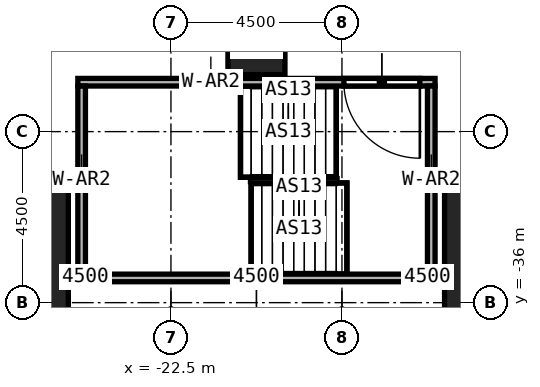
"""IFC4 building model, lengths in metres.
Left out: names, types, materials, properties, quantities, classifications, styles, units other than length and angle.
Written with IfcOpenShell. Run it as: python <this file> out.ifc"""

import sys

from ifc_helpers import new_model, si_unit, direction, frame, frame_2d, origin, origin_2d, place, context, subcontext, project, spatial, rectangle, extrude, element, fill, save


model = new_model("IFC4")
c1 = context("Model", 3, precision=1e-05, world=origin(), true_north=direction((0.0, 1.0)))
c2 = subcontext(c1, "Body", "Model", "MODEL_VIEW")
j1 = project(units=[si_unit("LENGTHUNIT", "METRE"), si_unit("PLANEANGLEUNIT", "RADIAN")], contexts=[c1])
p1 = place(None, origin())
s1 = spatial("IfcSite", under=j1, at=p1, CompositionType="ELEMENT")
p2 = place(p1, origin())
s2 = spatial("IfcBuilding", under=s1, at=p2, CompositionType="ELEMENT")
p3 = place(p2, frame((0.0, 0.0, 25.0)))
s3 = spatial("IfcBuildingStorey", under=s2, at=p3, CompositionType="ELEMENT", Elevation=25.0)
for number, where, z_axis, x_axis in (
    (1, (-27.0, -36.0, 0.0), (0.0, 0.0, 1.0), (1.0, 0.0, 0.0)),
    (2, (-13.5, -36.0, 0.0), (0.0, 0.0, 1.0), (1.0, 0.0, 0.0)),
):
    element("IfcColumn", number, at=place(p3, frame(where, z_axis=z_axis, x_axis=x_axis)), inside=s3, PredefinedType="COLUMN", context=c2, shape_type="SweptSolid", body=[
        extrude(rectangle(XDim=3.6, YDim=6.0, at=origin_2d()), origin(), (0.0, 0.0, 1.0), 6.0),
    ])
p4 = place(p3, frame((-20.25, -29.25, 0.0), z_axis=(0.0, 0.0, 1.0), x_axis=(1.0, 0.0, 0.0)))
e3 = element("IfcColumn", 3, at=p4, inside=s3, PredefinedType="COLUMN", context=c2, shape_type="SweptSolid", body=[
    extrude(rectangle(XDim=1.5, YDim=1.5, at=origin_2d()), origin(), (0.0, 0.0, 1.0), 6.0),
])
p5 = place(p3, frame((-15.55, -30.2, 0.0), z_axis=(0.0, 0.0, 1.0), x_axis=(-1.0, 0.0, 0.0)))
e4 = element("IfcWall", 4, at=p5, inside=s3, PredefinedType="SOLIDWALL", context=c2, shape_type="SweptSolid", body=[
    extrude(rectangle(XDim=9.4, YDim=0.2, at=frame_2d((4.7, 0.0))), origin(), (0.0, 0.0, 1.0), 6.0),
])
p6 = place(p5, frame((0.4, 0.0, 0.0)))
e5 = element("IfcOpeningElement", 5, at=p6, cuts=e4, PredefinedType="OPENING", context=c2, shape_type="SweptSolid", body=[
    extrude(rectangle(XDim=2.0, YDim=2.4, at=frame_2d((1.0, 1.2))), frame((0.0, 0.1, 0.0), z_axis=(0.0, -1.0, 0.0), x_axis=(1.0, 0.0, 0.0)), (0.0, 0.0, 1.0), 0.2),
])
p7 = place(p3, frame((-24.95, -35.35, 0.0), z_axis=(0.0, 0.0, 1.0), x_axis=(1.0, 0.0, 0.0)))
e6 = element("IfcWall", 6, at=p7, inside=s3, PredefinedType="SOLIDWALL", context=c2, shape_type="SweptSolid", body=[
    extrude(rectangle(XDim=9.4, YDim=0.2, at=frame_2d((4.7, 0.0))), origin(), (0.0, 0.0, 1.0), 6.0),
])
for number, where, z_axis, x_axis in (
    (7, (-24.85, -35.25, 0.0), (0.0, 0.0, 1.0), (0.0, 1.0, 0.0)),
    (8, (-15.65, -35.25, 0.0), (0.0, 0.0, 1.0), (0.0, 1.0, 0.0)),
):
    element("IfcWall", number, at=place(p3, frame(where, z_axis=z_axis, x_axis=x_axis)), inside=s3, PredefinedType="SOLIDWALL", context=c2, shape_type="SweptSolid", body=[
        extrude(rectangle(XDim=4.95, YDim=0.2, at=frame_2d((2.475, 0.0))), origin(), (0.0, 0.0, 1.0), 6.0),
    ])
p8 = place(p6, origin())
e9 = element("IfcDoor", 9, at=p8, inside=s3, OperationType="DOUBLE_DOOR_SINGLE_SWING", PredefinedType="DOOR", context=c2, shape_type="SweptSolid", body=[
    extrude(rectangle(XDim=2.0, YDim=2.4, at=frame_2d((1.0, 1.2))), frame((0.0, 0.025, 0.0), z_axis=(0.0, -1.0, 0.0), x_axis=(1.0, 0.0, 0.0)), (0.0, 0.0, 1.0), 0.05),
])
fill(e5, e9)
save(model, sys.argv[1])
